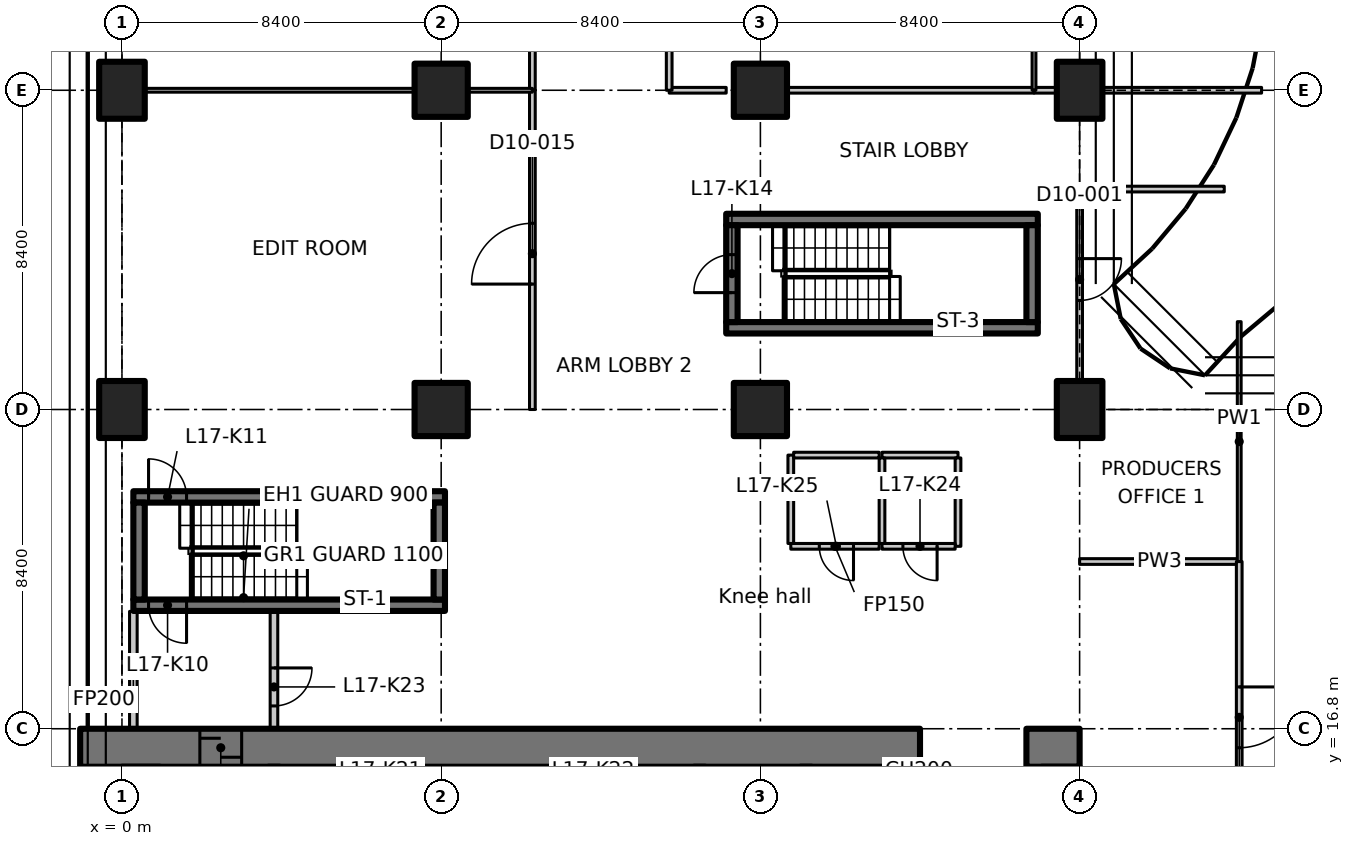
"""IFC4 building model, lengths in metres.
Left out: names, types, materials, properties, quantities, classifications, styles, units other than length and angle.
Written with IfcOpenShell. Run it as: python <this file> out.ifc"""

import sys

from ifc_helpers import new_model, si_unit, direction, frame, frame_2d, origin, origin_2d, place, context, subcontext, project, spatial, polyline, rectangle, outline, extrude, element, fill, save


model = new_model("IFC4")
c1 = context("Model", 3, precision=1e-05, world=origin(), true_north=direction((0.0, 1.0)))
c2 = subcontext(c1, "Body", "Model", "MODEL_VIEW")
j1 = project(units=[si_unit("LENGTHUNIT", "METRE"), si_unit("PLANEANGLEUNIT", "RADIAN")], contexts=[c1])
p1 = place(None, origin())
s1 = spatial("IfcSite", under=j1, at=p1, CompositionType="ELEMENT")
p2 = place(p1, origin())
s2 = spatial("IfcBuilding", under=s1, at=p2, CompositionType="ELEMENT")
p3 = place(p2, frame((0.0, 0.0, 76.1)))
s3 = spatial("IfcBuildingStorey", under=s2, at=p3, CompositionType="ELEMENT", Elevation=76.1)
for number, where, z_axis, x_axis in (
    (1, (0.0, 25.2, 0.0), (0.0, 0.0, 1.0), (1.0, 0.0, 0.0)),
    (2, (0.0, 33.6, 0.0), (0.0, 0.0, 1.0), (1.0, 0.0, 0.0)),
):
    element("IfcColumn", number, at=place(p3, frame(where, z_axis=z_axis, x_axis=x_axis)), inside=s3, PredefinedType="COLUMN", context=c2, shape_type="SweptSolid", body=[
        extrude(rectangle(XDim=1.2, YDim=1.5, at=origin_2d()), origin(), (0.0, 0.0, 1.0), 3.35),
    ])
for number, where, z_axis, x_axis in (
    (3, (8.4, 25.2, 0.0), (0.0, 0.0, 1.0), (1.0, 0.0, 0.0)),
    (4, (8.4, 33.6, 0.0), (0.0, 0.0, 1.0), (1.0, 0.0, 0.0)),
    (5, (16.8, 25.2, 0.0), (0.0, 0.0, 1.0), (1.0, 0.0, 0.0)),
    (6, (16.8, 33.6, 0.0), (0.0, 0.0, 1.0), (1.0, 0.0, 0.0)),
):
    element("IfcColumn", number, at=place(p3, frame(where, z_axis=z_axis, x_axis=x_axis)), inside=s3, PredefinedType="COLUMN", context=c2, shape_type="SweptSolid", body=[
        extrude(rectangle(XDim=1.4, YDim=1.4, at=origin_2d()), origin(), (0.0, 0.0, 1.0), 3.35),
    ])
for number, where, z_axis, x_axis in (
    (7, (25.2, 25.2, 0.0), (0.0, 0.0, 1.0), (1.0, 0.0, 0.0)),
    (8, (25.2, 33.6, 0.0), (0.0, 0.0, 1.0), (1.0, 0.0, 0.0)),
):
    element("IfcColumn", number, at=place(p3, frame(where, z_axis=z_axis, x_axis=x_axis)), inside=s3, PredefinedType="COLUMN", context=c2, shape_type="SweptSolid", body=[
        extrude(rectangle(XDim=1.2, YDim=1.5, at=origin_2d()), origin(), (0.0, 0.0, 1.0), 3.35),
    ])
p4 = place(p3, frame((-1.1, 16.3, 0.0), z_axis=(0.0, 0.0, 1.0), x_axis=(1.0, 0.0, 0.0)))
e9 = element("IfcWall", 9, at=p4, inside=s3, PredefinedType="SHEAR", context=c2, shape_type="SweptSolid", body=[
    extrude(rectangle(XDim=22.1, YDim=1.0, at=frame_2d((11.05, 0.0))), origin(), (0.0, 0.0, 1.0), 3.35),
])
p5 = place(p4, frame((3.15, 0.0, 0.0)))
e10 = element("IfcOpeningElement", 10, at=p5, cuts=e9, PredefinedType="OPENING", context=c2, shape_type="SweptSolid", body=[
    extrude(rectangle(XDim=1.1, YDim=2.3, at=frame_2d((0.55, 1.15))), frame((0.0, 0.51, 0.0), z_axis=(0.0, -1.0, 0.0), x_axis=(1.0, 0.0, 0.0)), (0.0, 0.0, 1.0), 1.02),
])
p6 = place(p3, frame((23.8, 16.3, 0.0), z_axis=(0.0, 0.0, 1.0), x_axis=(1.0, 0.0, 0.0)))
e11 = element("IfcWall", 11, at=p6, inside=s3, PredefinedType="SHEAR", context=c2, shape_type="SweptSolid", body=[
    extrude(rectangle(XDim=1.4, YDim=1.0, at=frame_2d((0.7, 0.0))), origin(), (0.0, 0.0, 1.0), 3.35),
])
p7 = place(p3, frame((24.7, 12.6, 0.0), z_axis=(0.0, 0.0, 1.0), x_axis=(0.0, 1.0, 0.0)))
e12 = element("IfcWall", 12, at=p7, inside=s3, PredefinedType="SHEAR", context=c2, shape_type="SweptSolid", body=[
    extrude(rectangle(XDim=3.2, YDim=1.0, at=frame_2d((1.6, 0.0))), origin(), (0.0, 0.0, 1.0), 3.35),
])
p8 = place(p3, frame((8.5, 20.05, 0.0), z_axis=(0.0, 0.0, 1.0), x_axis=(-1.0, 0.0, 0.0)))
e13 = element("IfcWall", 13, at=p8, inside=s3, PredefinedType="SHEAR", context=c2, shape_type="SweptSolid", body=[
    extrude(rectangle(XDim=8.2, YDim=0.3, at=frame_2d((4.1, 0.0))), origin(), (0.0, 0.0, 1.0), 3.35),
])
p9 = place(p8, frame((6.8, 0.0, 0.0)))
e14 = element("IfcOpeningElement", 14, at=p9, cuts=e13, PredefinedType="OPENING", context=c2, shape_type="SweptSolid", body=[
    extrude(rectangle(XDim=1.0, YDim=2.1, at=frame_2d((0.5, 1.05))), frame((0.0, 0.16, 0.0), z_axis=(0.0, -1.0, 0.0), x_axis=(1.0, 0.0, 0.0)), (0.0, 0.0, 1.0), 0.32),
])
p10 = place(p3, frame((0.3, 22.9, 0.0), z_axis=(0.0, 0.0, 1.0), x_axis=(1.0, 0.0, 0.0)))
e15 = element("IfcWall", 15, at=p10, inside=s3, PredefinedType="SHEAR", context=c2, shape_type="SweptSolid", body=[
    extrude(rectangle(XDim=8.2, YDim=0.3, at=frame_2d((4.1, 0.0))), origin(), (0.0, 0.0, 1.0), 3.35),
])
p11 = place(p10, frame((0.4, 0.0, 0.0)))
e16 = element("IfcOpeningElement", 16, at=p11, cuts=e15, PredefinedType="OPENING", context=c2, shape_type="SweptSolid", body=[
    extrude(rectangle(XDim=1.0, YDim=2.1, at=frame_2d((0.5, 1.05))), frame((0.0, 0.16, 0.0), z_axis=(0.0, -1.0, 0.0), x_axis=(1.0, 0.0, 0.0)), (0.0, 0.0, 1.0), 0.32),
])
for number, where, z_axis, x_axis in (
    (17, (0.45, 20.2, 0.0), (0.0, 0.0, 1.0), (0.0, 1.0, 0.0)),
    (18, (8.35, 20.2, 0.0), (0.0, 0.0, 1.0), (0.0, 1.0, 0.0)),
):
    element("IfcWall", number, at=place(p3, frame(where, z_axis=z_axis, x_axis=x_axis)), inside=s3, PredefinedType="SHEAR", context=c2, shape_type="SweptSolid", body=[
        extrude(rectangle(XDim=2.55, YDim=0.3, at=frame_2d((1.275, 0.0))), origin(), (0.0, 0.0, 1.0), 3.35),
    ])
for number, where, z_axis, x_axis in (
    (19, (15.9, 27.35, 0.0), (0.0, 0.0, 1.0), (1.0, 0.0, 0.0)),
    (20, (15.9, 30.2, 0.0), (0.0, 0.0, 1.0), (1.0, 0.0, 0.0)),
):
    element("IfcWall", number, at=place(p3, frame(where, z_axis=z_axis, x_axis=x_axis)), inside=s3, PredefinedType="SHEAR", context=c2, shape_type="SweptSolid", body=[
        extrude(rectangle(XDim=8.2, YDim=0.3, at=frame_2d((4.1, 0.0))), origin(), (0.0, 0.0, 1.0), 3.35),
    ])
p12 = place(p3, frame((16.05, 27.5, 0.0), z_axis=(0.0, 0.0, 1.0), x_axis=(0.0, 1.0, 0.0)))
e21 = element("IfcWall", 21, at=p12, inside=s3, PredefinedType="SHEAR", context=c2, shape_type="SweptSolid", body=[
    extrude(rectangle(XDim=2.55, YDim=0.3, at=frame_2d((1.275, 0.0))), origin(), (0.0, 0.0, 1.0), 3.35),
])
p13 = place(p12, frame((0.775, 0.0, 0.0)))
e22 = element("IfcOpeningElement", 22, at=p13, cuts=e21, PredefinedType="OPENING", context=c2, shape_type="SweptSolid", body=[
    extrude(rectangle(XDim=1.0, YDim=2.1, at=frame_2d((0.5, 1.05))), frame((0.0, 0.16, 0.0), z_axis=(0.0, -1.0, 0.0), x_axis=(1.0, 0.0, 0.0)), (0.0, 0.0, 1.0), 0.32),
])
p14 = place(p3, frame((23.95, 27.5, 0.0), z_axis=(0.0, 0.0, 1.0), x_axis=(0.0, 1.0, 0.0)))
e23 = element("IfcWall", 23, at=p14, inside=s3, PredefinedType="SHEAR", context=c2, shape_type="SweptSolid", body=[
    extrude(rectangle(XDim=2.55, YDim=0.3, at=frame_2d((1.275, 0.0))), origin(), (0.0, 0.0, 1.0), 3.35),
])
p15 = place(p3, frame((0.3, 16.812, 0.0), z_axis=(0.0, 0.0, 1.0), x_axis=(0.0, 1.0, 0.0)))
e24 = element("IfcWall", 24, at=p15, inside=s3, PredefinedType="PARTITIONING", context=c2, shape_type="SweptSolid", body=[
    extrude(rectangle(XDim=3.076, YDim=0.2, at=frame_2d((1.538, 0.0))), origin(), (0.0, 0.0, 1.0), 2.98),
])
p16 = place(p3, frame((4.0, 19.888, 0.0), z_axis=(0.0, 0.0, 1.0), x_axis=(0.0, -1.0, 0.0)))
e25 = element("IfcWall", 25, at=p16, inside=s3, PredefinedType="PARTITIONING", context=c2, shape_type="SweptSolid", body=[
    extrude(rectangle(XDim=3.076, YDim=0.2, at=frame_2d((1.538, 0.0))), origin(), (0.0, 0.0, 1.0), 3.35),
])
p17 = place(p16, frame((1.488, 0.0, 0.0)))
e26 = element("IfcOpeningElement", 26, at=p17, cuts=e25, PredefinedType="OPENING", context=c2, shape_type="SweptSolid", body=[
    extrude(rectangle(XDim=1.0, YDim=2.1, at=frame_2d((0.5, 1.05))), frame((0.0, 0.11, 0.0), z_axis=(0.0, -1.0, 0.0), x_axis=(1.0, 0.0, 0.0)), (0.0, 0.0, 1.0), 0.22),
])
p18 = place(p3, frame((20.0, 24.0, 0.0), z_axis=(0.0, 0.0, 1.0), x_axis=(1.0, 0.0, 0.0)))
e27 = element("IfcWall", 27, at=p18, inside=s3, PredefinedType="PARTITIONING", context=c2, shape_type="SweptSolid", body=[
    extrude(rectangle(XDim=2.0, YDim=0.15, at=frame_2d((1.0, 0.0))), origin(), (0.0, 0.0, 1.0), 3.35),
])
p19 = place(p3, frame((22.0, 23.925, 0.0), z_axis=(0.0, 0.0, 1.0), x_axis=(0.0, -1.0, 0.0)))
e28 = element("IfcWall", 28, at=p19, inside=s3, PredefinedType="PARTITIONING", context=c2, shape_type="SweptSolid", body=[
    extrude(rectangle(XDim=2.325, YDim=0.15, at=frame_2d((1.163, 0.0))), origin(), (0.0, 0.0, 1.0), 3.35),
])
p20 = place(p3, frame((21.925, 21.6, 0.0), z_axis=(0.0, 0.0, 1.0), x_axis=(-1.0, 0.0, 0.0)))
e29 = element("IfcWall", 29, at=p20, inside=s3, PredefinedType="PARTITIONING", context=c2, shape_type="SweptSolid", body=[
    extrude(rectangle(XDim=1.925, YDim=0.15, at=frame_2d((0.962, 0.0))), origin(), (0.0, 0.0, 1.0), 3.35),
])
p21 = place(p20, frame((0.475, 0.0, 0.0)))
e30 = element("IfcOpeningElement", 30, at=p21, cuts=e29, PredefinedType="OPENING", context=c2, shape_type="SweptSolid", body=[
    extrude(rectangle(XDim=0.9, YDim=2.1, at=frame_2d((0.45, 1.05))), frame((0.0, 0.085, 0.0), z_axis=(0.0, -1.0, 0.0), x_axis=(1.0, 0.0, 0.0)), (0.0, 0.0, 1.0), 0.17),
])
p22 = place(p3, frame((20.0, 21.675, 0.0), z_axis=(0.0, 0.0, 1.0), x_axis=(0.0, 1.0, 0.0)))
e31 = element("IfcWall", 31, at=p22, inside=s3, PredefinedType="PARTITIONING", context=c2, shape_type="SweptSolid", body=[
    extrude(rectangle(XDim=2.25, YDim=0.15, at=frame_2d((1.125, 0.0))), origin(), (0.0, 0.0, 1.0), 3.35),
])
p23 = place(p3, frame((19.925, 21.6, 0.0), z_axis=(0.0, 0.0, 1.0), x_axis=(-1.0, 0.0, 0.0)))
e32 = element("IfcWall", 32, at=p23, inside=s3, PredefinedType="PARTITIONING", context=c2, shape_type="SweptSolid", body=[
    extrude(rectangle(XDim=2.325, YDim=0.15, at=frame_2d((1.163, 0.0))), origin(), (0.0, 0.0, 1.0), 3.35),
])
p24 = place(p23, frame((0.675, 0.0, 0.0)))
e33 = element("IfcOpeningElement", 33, at=p24, cuts=e32, PredefinedType="OPENING", context=c2, shape_type="SweptSolid", body=[
    extrude(rectangle(XDim=0.9, YDim=2.1, at=frame_2d((0.45, 1.05))), frame((0.0, 0.085, 0.0), z_axis=(0.0, -1.0, 0.0), x_axis=(1.0, 0.0, 0.0)), (0.0, 0.0, 1.0), 0.17),
])
p25 = place(p3, frame((17.6, 21.675, 0.0), z_axis=(0.0, 0.0, 1.0), x_axis=(0.0, 1.0, 0.0)))
e34 = element("IfcWall", 34, at=p25, inside=s3, PredefinedType="PARTITIONING", context=c2, shape_type="SweptSolid", body=[
    extrude(rectangle(XDim=2.325, YDim=0.15, at=frame_2d((1.163, 0.0))), origin(), (0.0, 0.0, 1.0), 3.35),
])
p26 = place(p3, frame((17.675, 24.0, 0.0), z_axis=(0.0, 0.0, 1.0), x_axis=(1.0, 0.0, 0.0)))
e35 = element("IfcWall", 35, at=p26, inside=s3, PredefinedType="PARTITIONING", context=c2, shape_type="SweptSolid", body=[
    extrude(rectangle(XDim=2.25, YDim=0.15, at=frame_2d((1.125, 0.0))), origin(), (0.0, 0.0, 1.0), 3.35),
])
p27 = place(p3, frame((25.2, 21.2, 0.0), z_axis=(0.0, 0.0, 1.0), x_axis=(1.0, 0.0, 0.0)))
e36 = element("IfcWall", 36, at=p27, inside=s3, PredefinedType="PARTITIONING", context=c2, shape_type="SweptSolid", body=[
    extrude(rectangle(XDim=4.2, YDim=0.15, at=frame_2d((2.1, 0.0))), origin(), (0.0, 0.0, 1.0), 3.33),
])
p28 = place(p3, frame((29.4, 21.2, 0.0), z_axis=(0.0, 0.0, 1.0), x_axis=(0.0, -1.0, 0.0)))
e37 = element("IfcWall", 37, at=p28, inside=s3, PredefinedType="PARTITIONING", context=c2, shape_type="SweptSolid", body=[
    extrude(rectangle(XDim=8.2, YDim=0.15, at=frame_2d((4.1, 0.0))), origin(), (0.0, 0.0, 1.0), 3.33),
])
p29 = place(p28, frame((3.3, 0.0, 0.0)))
e38 = element("IfcOpeningElement", 38, at=p29, cuts=e37, PredefinedType="OPENING", context=c2, shape_type="SweptSolid", body=[
    extrude(rectangle(XDim=1.6, YDim=2.1, at=frame_2d((0.8, 1.05))), frame((0.0, 0.085, 0.0), z_axis=(0.0, -1.0, 0.0), x_axis=(1.0, 0.0, 0.0)), (0.0, 0.0, 1.0), 0.17),
])
p30 = place(p3, frame((29.4, 27.511, 0.0), z_axis=(0.0, 0.0, 1.0), x_axis=(0.0, -1.0, 0.0)))
e39 = element("IfcWall", 39, at=p30, inside=s3, PredefinedType="PARTITIONING", context=c2, shape_type="SweptSolid", body=[
    extrude(outline(polyline([(0.0, 0.0), (6.311, 0.0), (6.311, 3.33), (2.761, 3.33), (2.759, 2.98), (1.863, 2.98), (1.861, 3.33), (0.236, 3.33), (0.0, 3.33), (0.0, 0.0)])), frame((0.0, 0.05, 0.0), z_axis=(0.0, -1.0, 0.0), x_axis=(1.0, 0.0, 0.0)), (0.0, 0.0, 1.0), 0.1),
])
p31 = place(p3, frame((25.2, 31.0, 0.0), z_axis=(0.0, 0.0, 1.0), x_axis=(0.0, -1.0, 0.0)))
e40 = element("IfcWall", 40, at=p31, inside=s3, PredefinedType="PARTITIONING", context=c2, shape_type="SweptSolid", body=[
    extrude(outline(polyline([(0.0, 0.0), (5.03, 0.0), (5.03, 2.98), (0.0, 2.98), (0.0, 0.0)])), frame((0.0, 0.075, 0.0), z_axis=(0.0, -1.0, 0.0), x_axis=(1.0, 0.0, 0.0)), (0.0, 0.0, 1.0), 0.15),
])
p32 = place(p31, frame((1.83, 0.0, 0.0)))
e41 = element("IfcOpeningElement", 41, at=p32, cuts=e40, PredefinedType="OPENING", context=c2, shape_type="SweptSolid", body=[
    extrude(rectangle(XDim=1.1, YDim=2.1, at=frame_2d((0.55, 1.05))), frame((0.0, 0.085, 0.0), z_axis=(0.0, -1.0, 0.0), x_axis=(1.0, 0.0, 0.0)), (0.0, 0.0, 1.0), 0.17),
])
p33 = place(p3, frame((25.2, 31.0, 0.0), z_axis=(0.0, 0.0, 1.0), x_axis=(1.0, 0.0, 0.0)))
e42 = element("IfcWall", 42, at=p33, inside=s3, PredefinedType="PARTITIONING", context=c2, shape_type="SweptSolid", body=[
    extrude(rectangle(XDim=3.806, YDim=0.15, at=frame_2d((1.903, 0.0))), origin(), (0.0, 0.0, 1.0), 2.98),
])
p34 = place(p3, frame((10.8, 25.2, 0.0), z_axis=(0.0, 0.0, 1.0), x_axis=(0.0, 1.0, 0.0)))
e43 = element("IfcWall", 43, at=p34, inside=s3, PredefinedType="PARTITIONING", context=c2, shape_type="SweptSolid", body=[
    extrude(rectangle(XDim=8.4, YDim=0.15, at=frame_2d((4.2, 0.0))), origin(), (0.0, 0.0, 1.0), 3.33),
])
p35 = place(p34, frame((3.3, 0.0, 0.0)))
e44 = element("IfcOpeningElement", 44, at=p35, cuts=e43, PredefinedType="OPENING", context=c2, shape_type="SweptSolid", body=[
    extrude(rectangle(XDim=1.6, YDim=2.1, at=frame_2d((0.8, 1.05))), frame((0.0, 0.085, 0.0), z_axis=(0.0, -1.0, 0.0), x_axis=(1.0, 0.0, 0.0)), (0.0, 0.0, 1.0), 0.17),
])
p36 = place(p3, frame((14.4, 33.6, 0.0), z_axis=(0.0, 0.0, 1.0), x_axis=(1.0, 0.0, 0.0)))
e45 = element("IfcWall", 45, at=p36, inside=s3, PredefinedType="PARTITIONING", context=c2, shape_type="SweptSolid", body=[
    extrude(rectangle(XDim=1.5, YDim=0.15, at=frame_2d((0.75, 0.0))), origin(), (0.0, 0.0, 1.0), 3.33),
])
p37 = place(p3, frame((17.52, 33.6, 0.0), z_axis=(0.0, 0.0, 1.0), x_axis=(1.0, 0.0, 0.0)))
e46 = element("IfcWall", 46, at=p37, inside=s3, PredefinedType="PARTITIONING", context=c2, shape_type="SweptSolid", body=[
    extrude(rectangle(XDim=6.48, YDim=0.15, at=frame_2d((3.24, 0.0))), origin(), (0.0, 0.0, 1.0), 3.33),
])
p38 = place(p3, frame((24.0, 33.6, 0.0), z_axis=(0.0, 0.0, 1.0), x_axis=(1.0, 0.0, 0.0)))
e47 = element("IfcWall", 47, at=p38, inside=s3, PredefinedType="PARTITIONING", context=c2, shape_type="SweptSolid", body=[
    extrude(rectangle(XDim=0.58, YDim=0.15, at=frame_2d((0.29, 0.0))), origin(), (0.0, 0.0, 1.0), 3.33),
])
p39 = place(p3, frame((25.82, 33.6, 0.0), z_axis=(0.0, 0.0, 1.0), x_axis=(1.0, 0.0, 0.0)))
e48 = element("IfcWall", 48, at=p39, inside=s3, PredefinedType="PARTITIONING", context=c2, shape_type="SweptSolid", body=[
    extrude(rectangle(XDim=4.168, YDim=0.15, at=frame_2d((2.084, 0.0))), origin(), (0.0, 0.0, 1.0), 2.98),
])
p40 = place(p3, frame((10.8, 33.6, 0.0), z_axis=(0.0, 0.0, 1.0), x_axis=(0.0, 1.0, 0.0)))
e49 = element("IfcWall", 49, at=p40, inside=s3, PredefinedType="PARTITIONING", context=c2, shape_type="SweptSolid", body=[
    extrude(rectangle(XDim=8.4, YDim=0.15, at=frame_2d((4.2, 0.0))), origin(), (0.0, 0.0, 1.0), 3.33),
])
p41 = place(p40, frame((3.3, 0.0, 0.0)))
e50 = element("IfcOpeningElement", 50, at=p41, cuts=e49, PredefinedType="OPENING", context=c2, shape_type="SweptSolid", body=[
    extrude(rectangle(XDim=1.6, YDim=2.1, at=frame_2d((0.8, 1.05))), frame((0.0, 0.085, 0.0), z_axis=(0.0, -1.0, 0.0), x_axis=(1.0, 0.0, 0.0)), (0.0, 0.0, 1.0), 0.17),
])
p42 = place(p3, frame((14.4, 37.8, 0.0), z_axis=(0.0, 0.0, 1.0), x_axis=(0.0, -1.0, 0.0)))
e51 = element("IfcWall", 51, at=p42, inside=s3, PredefinedType="PARTITIONING", context=c2, shape_type="SweptSolid", body=[
    extrude(rectangle(XDim=4.2, YDim=0.15, at=frame_2d((2.1, 0.0))), origin(), (0.0, 0.0, 1.0), 3.33),
])
p43 = place(p3, frame((0.62, 33.6, 0.0), z_axis=(0.0, 0.0, 1.0), x_axis=(1.0, 0.0, 0.0)))
e52 = element("IfcWall", 52, at=p43, inside=s3, PredefinedType="PARTITIONING", context=c2, shape_type="SweptSolid", body=[
    extrude(rectangle(XDim=7.06, YDim=0.1, at=frame_2d((3.53, 0.0))), origin(), (0.0, 0.0, 1.0), 3.33),
])
p44 = place(p3, frame((9.12, 33.6, 0.0), z_axis=(0.0, 0.0, 1.0), x_axis=(1.0, 0.0, 0.0)))
e53 = element("IfcWall", 53, at=p44, inside=s3, PredefinedType="PARTITIONING", context=c2, shape_type="SweptSolid", body=[
    extrude(rectangle(XDim=1.68, YDim=0.1, at=frame_2d((0.84, 0.0))), origin(), (0.0, 0.0, 1.0), 3.33),
])
p45 = place(p3, frame((24.0, 37.8, 0.0), z_axis=(0.0, 0.0, 1.0), x_axis=(0.0, -1.0, 0.0)))
e54 = element("IfcWall", 54, at=p45, inside=s3, PredefinedType="PARTITIONING", context=c2, shape_type="SweptSolid", body=[
    extrude(rectangle(XDim=4.2, YDim=0.1, at=frame_2d((2.1, 0.0))), origin(), (0.0, 0.0, 1.0), 3.33),
])
p46 = place(p5, origin())
e55 = element("IfcDoor", 55, at=p46, inside=s3, OperationType="SLIDING_TO_LEFT", PredefinedType="DOOR", context=c2, shape_type="SweptSolid", body=[
    extrude(rectangle(XDim=1.1, YDim=2.3, at=frame_2d((0.55, 1.15))), frame((0.0, 0.025, 0.0), z_axis=(0.0, -1.0, 0.0), x_axis=(1.0, 0.0, 0.0)), (0.0, 0.0, 1.0), 0.05),
])
fill(e10, e55)
p47 = place(p9, origin())
e56 = element("IfcDoor", 56, at=p47, inside=s3, OperationType="SINGLE_SWING_RIGHT", PredefinedType="DOOR", context=c2, shape_type="SweptSolid", body=[
    extrude(rectangle(XDim=1.0, YDim=2.1, at=frame_2d((0.5, 1.05))), frame((0.0, 0.025, 0.0), z_axis=(0.0, -1.0, 0.0), x_axis=(1.0, 0.0, 0.0)), (0.0, 0.0, 1.0), 0.05),
])
fill(e14, e56)
p48 = place(p11, origin())
e57 = element("IfcDoor", 57, at=p48, inside=s3, OperationType="SINGLE_SWING_LEFT", PredefinedType="DOOR", context=c2, shape_type="SweptSolid", body=[
    extrude(rectangle(XDim=1.0, YDim=2.1, at=frame_2d((0.5, 1.05))), frame((0.0, 0.025, 0.0), z_axis=(0.0, -1.0, 0.0), x_axis=(1.0, 0.0, 0.0)), (0.0, 0.0, 1.0), 0.05),
])
fill(e16, e57)
p49 = place(p13, origin())
e58 = element("IfcDoor", 58, at=p49, inside=s3, OperationType="SINGLE_SWING_RIGHT", PredefinedType="DOOR", context=c2, shape_type="SweptSolid", body=[
    extrude(rectangle(XDim=1.0, YDim=2.1, at=frame_2d((0.5, 1.05))), frame((0.0, 0.025, 0.0), z_axis=(0.0, -1.0, 0.0), x_axis=(1.0, 0.0, 0.0)), (0.0, 0.0, 1.0), 0.05),
])
fill(e22, e58)
p50 = place(p17, origin())
e59 = element("IfcDoor", 59, at=p50, inside=s3, OperationType="SINGLE_SWING_LEFT", PredefinedType="DOOR", context=c2, shape_type="SweptSolid", body=[
    extrude(rectangle(XDim=1.0, YDim=2.1, at=frame_2d((0.5, 1.05))), frame((0.0, 0.025, 0.0), z_axis=(0.0, -1.0, 0.0), x_axis=(1.0, 0.0, 0.0)), (0.0, 0.0, 1.0), 0.05),
])
fill(e26, e59)
p51 = place(p21, origin())
e60 = element("IfcDoor", 60, at=p51, inside=s3, OperationType="SINGLE_SWING_RIGHT", PredefinedType="DOOR", context=c2, shape_type="SweptSolid", body=[
    extrude(rectangle(XDim=0.9, YDim=2.1, at=frame_2d((0.45, 1.05))), frame((0.0, 0.025, 0.0), z_axis=(0.0, -1.0, 0.0), x_axis=(1.0, 0.0, 0.0)), (0.0, 0.0, 1.0), 0.05),
])
fill(e30, e60)
p52 = place(p24, origin())
e61 = element("IfcDoor", 61, at=p52, inside=s3, OperationType="SINGLE_SWING_LEFT", PredefinedType="DOOR", context=c2, shape_type="SweptSolid", body=[
    extrude(rectangle(XDim=0.9, YDim=2.1, at=frame_2d((0.45, 1.05))), frame((0.0, 0.025, 0.0), z_axis=(0.0, -1.0, 0.0), x_axis=(1.0, 0.0, 0.0)), (0.0, 0.0, 1.0), 0.05),
])
fill(e33, e61)
p53 = place(p32, origin())
e62 = element("IfcDoor", 62, at=p53, inside=s3, OperationType="SINGLE_SWING_RIGHT", PredefinedType="DOOR", context=c2, shape_type="SweptSolid", body=[
    extrude(rectangle(XDim=1.1, YDim=2.1, at=frame_2d((0.55, 1.05))), frame((0.0, 0.025, 0.0), z_axis=(0.0, -1.0, 0.0), x_axis=(1.0, 0.0, 0.0)), (0.0, 0.0, 1.0), 0.05),
])
fill(e41, e62)
p54 = place(p29, origin())
e63 = element("IfcDoor", 63, at=p54, inside=s3, OperationType="DOUBLE_DOOR_SINGLE_SWING", PredefinedType="DOOR", context=c2, shape_type="SweptSolid", body=[
    extrude(rectangle(XDim=1.6, YDim=2.1, at=frame_2d((0.8, 1.05))), frame((0.0, 0.025, 0.0), z_axis=(0.0, -1.0, 0.0), x_axis=(1.0, 0.0, 0.0)), (0.0, 0.0, 1.0), 0.05),
])
fill(e38, e63)
p55 = place(p35, origin())
e64 = element("IfcDoor", 64, at=p55, inside=s3, OperationType="DOUBLE_DOOR_SINGLE_SWING", PredefinedType="DOOR", context=c2, shape_type="SweptSolid", body=[
    extrude(rectangle(XDim=1.6, YDim=2.1, at=frame_2d((0.8, 1.05))), frame((0.0, 0.025, 0.0), z_axis=(0.0, -1.0, 0.0), x_axis=(1.0, 0.0, 0.0)), (0.0, 0.0, 1.0), 0.05),
])
fill(e44, e64)
save(model, sys.argv[1])
